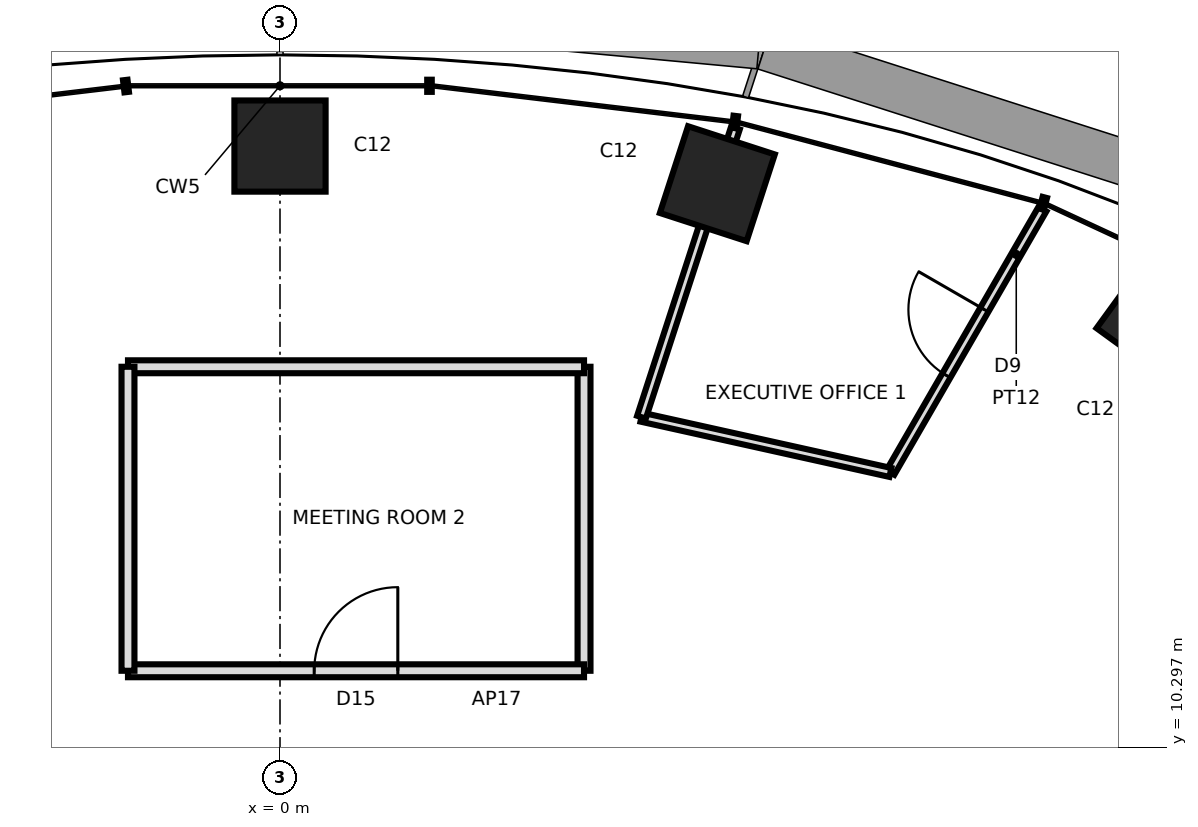
"""IFC4 building model, lengths in metres.
Left out: names, types, materials, properties, quantities, classifications, styles, units other than length and angle.
Written with IfcOpenShell. Run it as: python <this file> out.ifc"""

import sys

from ifc_helpers import new_model, si_unit, direction, frame, frame_2d, origin, origin_2d, place, context, subcontext, project, spatial, rectangle, extrude, element, fill, save


model = new_model("IFC4")
c1 = context("Model", 3, precision=1e-05, world=origin(), true_north=direction((0.0, 1.0)))
c2 = subcontext(c1, "Body", "Model", "MODEL_VIEW")
j1 = project(units=[si_unit("LENGTHUNIT", "METRE"), si_unit("PLANEANGLEUNIT", "RADIAN")], contexts=[c1])
p1 = place(None, origin())
s1 = spatial("IfcSite", under=j1, at=p1, CompositionType="ELEMENT")
p2 = place(p1, origin())
s2 = spatial("IfcBuilding", under=s1, at=p2, CompositionType="ELEMENT")
p3 = place(p2, frame((0.0, 0.0, 268.6)))
s3 = spatial("IfcBuildingStorey", under=s2, at=p3, CompositionType="ELEMENT", Elevation=268.6)
for number, where, z_axis, x_axis in (
    (1, (11.581, 15.94, 0.0), (0.0, 0.0, 1.0), (0.588, 0.809, 0.0)),
    (2, (5.754, 17.708, 0.0), (0.0, 0.0, 1.0), (0.309, 0.951, 0.0)),
    (3, (0.0, 18.204, 0.0), (0.0, 0.0, 1.0), (0.0, 1.0, 0.0)),
):
    element("IfcColumn", number, at=place(p3, frame(where, z_axis=z_axis, x_axis=x_axis)), inside=s3, PredefinedType="COLUMN", context=c2, shape_type="SweptSolid", body=[
        extrude(rectangle(XDim=1.2, YDim=1.2, at=origin_2d()), origin(), (0.0, 0.0, 1.0), 4.2),
    ])
p4 = place(p3, frame((8.031, 13.909, 0.0), z_axis=(0.0, 0.0, 1.0), x_axis=(0.49999894854, 0.866026010844, 0.0)))
e4 = element("IfcWall", 4, at=p4, inside=s3, PredefinedType="PARTITIONING", context=c2, shape_type="SweptSolid", body=[
    extrude(rectangle(XDim=4.0, YDim=0.12, at=frame_2d((2.0, 0.0))), origin(), (0.0, 0.0, 1.0), 4.04),
])
p5 = place(p4, frame((1.474, 0.0, 0.0)))
e5 = element("IfcOpeningElement", 5, at=p5, cuts=e4, PredefinedType="OPENING", context=c2, shape_type="SweptSolid", body=[
    extrude(rectangle(XDim=1.0, YDim=2.4, at=frame_2d((0.5, 1.2))), frame((0.0, 0.07, 0.0), z_axis=(0.0, -1.0, 0.0), x_axis=(1.0, 0.0, 0.0)), (0.0, 0.0, 1.0), 0.14),
])
p6 = place(p3, frame((4.756, 14.637, 0.0), z_axis=(0.0, 0.0, 1.0), x_axis=(0.976216161762, -0.216799459213, 0.0)))
e6 = element("IfcWall", 6, at=p6, inside=s3, PredefinedType="PARTITIONING", context=c2, shape_type="SweptSolid", body=[
    extrude(rectangle(XDim=3.355, YDim=0.12, at=frame_2d((1.677, 0.0))), origin(), (0.0, 0.0, 1.0), 4.04),
])
p7 = place(p3, frame((5.992, 18.441, 0.0), z_axis=(0.0, 0.0, 1.0), x_axis=(-0.309022586479, -0.951054699292, 0.0)))
e7 = element("IfcWall", 7, at=p7, inside=s3, PredefinedType="PARTITIONING", context=c2, shape_type="SweptSolid", body=[
    extrude(rectangle(XDim=4.0, YDim=0.12, at=frame_2d((2.0, 0.0))), origin(), (0.0, 0.0, 1.0), 3.24),
])
p8 = place(p3, frame((4.0, 15.3, 0.0), z_axis=(0.0, 0.0, 1.0), x_axis=(0.0, -1.0, 0.0)))
e8 = element("IfcWall", 8, at=p8, inside=s3, PredefinedType="PARTITIONING", context=c2, shape_type="SweptSolid", body=[
    extrude(rectangle(XDim=4.0, YDim=0.17, at=frame_2d((2.0, 0.0))), origin(), (0.0, 0.0, 1.0), 4.04),
])
p9 = place(p3, frame((4.0, 11.3, 0.0), z_axis=(0.0, 0.0, 1.0), x_axis=(-1.0, 0.0, 0.0)))
e9 = element("IfcWall", 9, at=p9, inside=s3, PredefinedType="PARTITIONING", context=c2, shape_type="SweptSolid", body=[
    extrude(rectangle(XDim=6.0, YDim=0.17, at=frame_2d((3.0, 0.0))), origin(), (0.0, 0.0, 1.0), 4.04),
])
p10 = place(p9, frame((2.45, 0.0, 0.0)))
e10 = element("IfcOpeningElement", 10, at=p10, cuts=e9, PredefinedType="OPENING", context=c2, shape_type="SweptSolid", body=[
    extrude(rectangle(XDim=1.1, YDim=2.4, at=frame_2d((0.55, 1.2))), frame((0.0, 0.095, 0.0), z_axis=(0.0, -1.0, 0.0), x_axis=(1.0, 0.0, 0.0)), (0.0, 0.0, 1.0), 0.19),
])
p11 = place(p3, frame((-2.0, 15.3, 0.0), z_axis=(0.0, 0.0, 1.0), x_axis=(1.0, 0.0, 0.0)))
e11 = element("IfcWall", 11, at=p11, inside=s3, PredefinedType="PARTITIONING", context=c2, shape_type="SweptSolid", body=[
    extrude(rectangle(XDim=6.0, YDim=0.17, at=frame_2d((3.0, 0.0))), origin(), (0.0, 0.0, 1.0), 3.637),
])
p12 = place(p3, frame((-2.0, 11.3, 0.0), z_axis=(0.0, 0.0, 1.0), x_axis=(0.0, 1.0, 0.0)))
e12 = element("IfcWall", 12, at=p12, inside=s3, PredefinedType="PARTITIONING", context=c2, shape_type="SweptSolid", body=[
    extrude(rectangle(XDim=4.0, YDim=0.17, at=frame_2d((2.0, 0.0))), origin(), (0.0, 0.0, 1.0), 4.04),
])
p13 = place(p5, origin())
e13 = element("IfcDoor", 13, at=p13, inside=s3, OperationType="SINGLE_SWING_RIGHT", PredefinedType="DOOR", context=c2, shape_type="SweptSolid", body=[
    extrude(rectangle(XDim=1.0, YDim=2.4, at=frame_2d((0.5, 1.2))), frame((0.0, 0.025, 0.0), z_axis=(0.0, -1.0, 0.0), x_axis=(1.0, 0.0, 0.0)), (0.0, 0.0, 1.0), 0.05),
])
fill(e5, e13)
p14 = place(p10, frame((1.1, 0.0, 0.0), z_axis=(0.0, 0.0, 1.0), x_axis=(-1.0, 0.0, 0.0)))
e14 = element("IfcDoor", 14, at=p14, inside=s3, OperationType="SINGLE_SWING_RIGHT", PredefinedType="DOOR", context=c2, shape_type="SweptSolid", body=[
    extrude(rectangle(XDim=1.1, YDim=2.4, at=frame_2d((0.55, 1.2))), frame((0.0, 0.025, 0.0), z_axis=(0.0, -1.0, 0.0), x_axis=(1.0, 0.0, 0.0)), (0.0, 0.0, 1.0), 0.05),
])
fill(e10, e14)
save(model, sys.argv[1])
